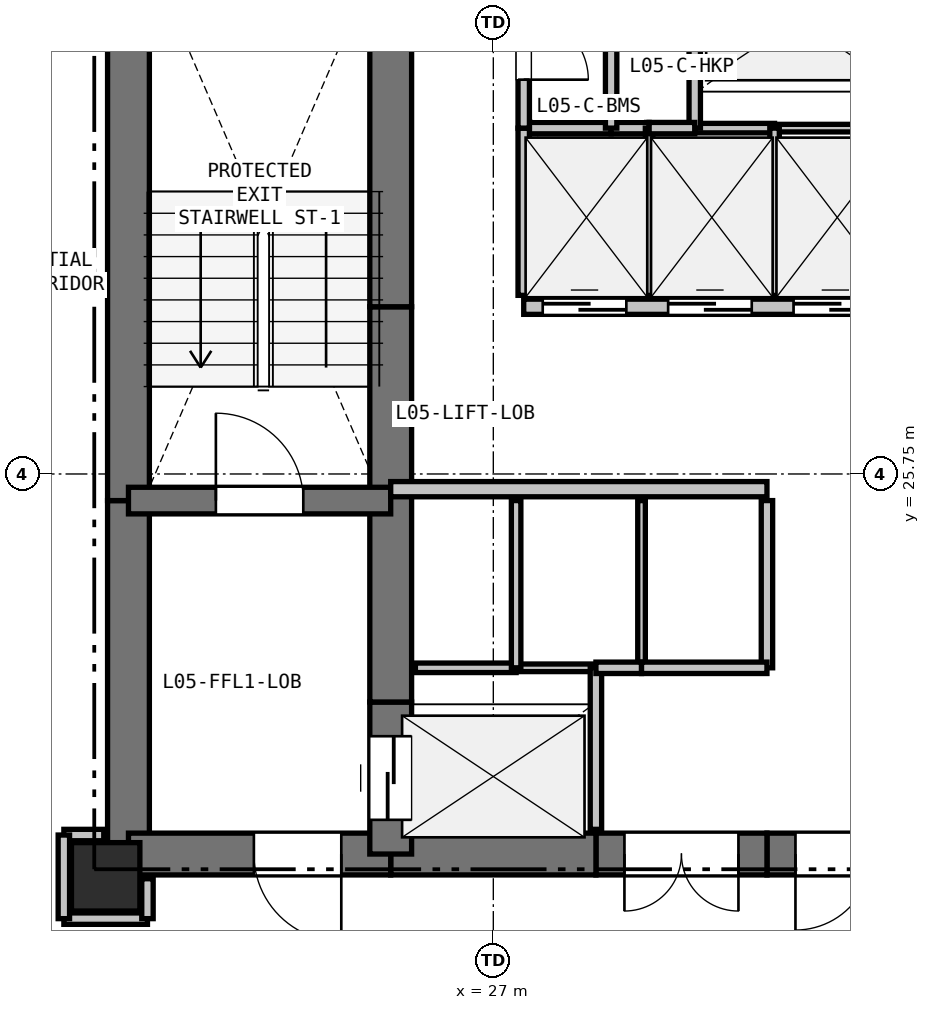
"""IFC4 building model, lengths in metres.
Left out: names, types, materials, properties, quantities, classifications, styles, units other than length and angle.
Written with IfcOpenShell. Run it as: python <this file> out.ifc"""

import sys

from ifc_helpers import new_model, si_unit, direction, frame, frame_2d, origin, origin_2d, place, context, subcontext, project, spatial, rectangle, extrude, element, fill, save


model = new_model("IFC4")
c1 = context("Model", 3, precision=1e-05, world=origin(), true_north=direction((0.0, 1.0)))
c2 = subcontext(c1, "Body", "Model", "MODEL_VIEW")
j1 = project(units=[si_unit("LENGTHUNIT", "METRE"), si_unit("PLANEANGLEUNIT", "RADIAN")], contexts=[c1])
p1 = place(None, origin())
s1 = spatial("IfcSite", under=j1, at=p1, CompositionType="ELEMENT")
p2 = place(p1, origin())
s2 = spatial("IfcBuilding", under=s1, at=p2, CompositionType="ELEMENT")
p3 = place(p2, frame((0.0, 0.0, 22.5)))
s3 = spatial("IfcBuildingStorey", under=s2, at=p3, CompositionType="ELEMENT", Elevation=22.5)
p4 = place(p3, frame((21.9, 20.45, 0.0), z_axis=(0.0, 0.0, 1.0), x_axis=(1.0, 0.0, 0.0)))
e1 = element("IfcColumn", 1, at=p4, inside=s3, PredefinedType="COLUMN", context=c2, shape_type="SweptSolid", body=[
    extrude(rectangle(XDim=0.9, YDim=0.9, at=origin_2d()), origin(), (0.0, 0.0, 1.0), 3.3),
])
p5 = place(p3, frame((22.2, 20.75, 0.0), z_axis=(0.0, 0.0, 1.0), x_axis=(0.0, 1.0, 0.0)))
e2 = element("IfcWall", 2, at=p5, inside=s3, PredefinedType="SHEAR", context=c2, shape_type="SweptSolid", body=[
    extrude(rectangle(XDim=4.65, YDim=0.55, at=frame_2d((2.325, 0.0))), origin(), (0.0, 0.0, 1.0), 3.04),
])
p6 = place(p3, frame((22.2, 25.4, 0.0), z_axis=(0.0, 0.0, 1.0), x_axis=(0.0, 1.0, 0.0)))
e3 = element("IfcWall", 3, at=p6, inside=s3, PredefinedType="SHEAR", context=c2, shape_type="SweptSolid", body=[
    extrude(rectangle(XDim=7.35, YDim=0.55, at=frame_2d((3.675, 0.0))), origin(), (0.0, 0.0, 1.0), 3.04),
])
p7 = place(p3, frame((32.35, 20.75, 0.0), z_axis=(0.0, 0.0, 1.0), x_axis=(-1.0, 0.0, 0.0)))
e4 = element("IfcWall", 4, at=p7, inside=s3, PredefinedType="SHEAR", context=c2, shape_type="SweptSolid", body=[
    extrude(rectangle(XDim=1.75, YDim=0.55, at=frame_2d((0.875, 0.0))), origin(), (0.0, 0.0, 1.0), 3.04),
])
p8 = place(p7, frame((0.375, 0.0, 0.0)))
e5 = element("IfcOpeningElement", 5, at=p8, cuts=e4, PredefinedType="OPENING", context=c2, shape_type="SweptSolid", body=[
    extrude(rectangle(XDim=1.0, YDim=2.15, at=frame_2d((0.5, 1.075))), frame((0.0, 0.285, 0.0), z_axis=(0.0, -1.0, 0.0), x_axis=(1.0, 0.0, 0.0)), (0.0, 0.0, 1.0), 0.57),
])
p9 = place(p3, frame((30.6, 20.75, 0.0), z_axis=(0.0, 0.0, 1.0), x_axis=(-1.0, 0.0, 0.0)))
e6 = element("IfcWall", 6, at=p9, inside=s3, PredefinedType="SHEAR", context=c2, shape_type="SweptSolid", body=[
    extrude(rectangle(XDim=2.25, YDim=0.55, at=frame_2d((1.125, 0.0))), origin(), (0.0, 0.0, 1.0), 3.04),
])
p10 = place(p9, frame((0.375, 0.0, 0.0)))
e7 = element("IfcOpeningElement", 7, at=p10, cuts=e6, PredefinedType="OPENING", context=c2, shape_type="SweptSolid", body=[
    extrude(rectangle(XDim=1.5, YDim=2.2, at=frame_2d((0.75, 1.1))), frame((0.0, 0.285, 0.0), z_axis=(0.0, -1.0, 0.0), x_axis=(1.0, 0.0, 0.0)), (0.0, 0.0, 1.0), 0.57),
])
p11 = place(p3, frame((28.35, 20.75, 0.0), z_axis=(0.0, 0.0, 1.0), x_axis=(-1.0, 0.0, 0.0)))
e8 = element("IfcWall", 8, at=p11, inside=s3, PredefinedType="SHEAR", context=c2, shape_type="SweptSolid", body=[
    extrude(rectangle(XDim=2.7, YDim=0.55, at=frame_2d((1.35, 0.0))), origin(), (0.0, 0.0, 1.0), 3.04),
])
p12 = place(p3, frame((25.65, 20.75, 0.0), z_axis=(0.0, 0.0, 1.0), x_axis=(-1.0, 0.0, 0.0)))
e9 = element("IfcWall", 9, at=p12, inside=s3, PredefinedType="SHEAR", context=c2, shape_type="SweptSolid", body=[
    extrude(rectangle(XDim=3.45, YDim=0.55, at=frame_2d((1.725, 0.0))), origin(), (0.0, 0.0, 1.0), 3.04),
])
p13 = place(p12, frame((0.65, 0.0, 0.0)))
e10 = element("IfcOpeningElement", 10, at=p13, cuts=e9, PredefinedType="OPENING", context=c2, shape_type="SweptSolid", body=[
    extrude(rectangle(XDim=1.15, YDim=2.15, at=frame_2d((0.575, 1.075))), frame((0.0, 0.285, 0.0), z_axis=(0.0, -1.0, 0.0), x_axis=(1.0, 0.0, 0.0)), (0.0, 0.0, 1.0), 0.57),
])
p14 = place(p3, frame((25.65, 20.75, 0.0), z_axis=(0.0, 0.0, 1.0), x_axis=(0.0, 1.0, 0.0)))
e11 = element("IfcWall", 11, at=p14, inside=s3, PredefinedType="SHEAR", context=c2, shape_type="SweptSolid", body=[
    extrude(rectangle(XDim=2.0, YDim=0.55, at=frame_2d((1.0, 0.0))), origin(), (0.0, 0.0, 1.0), 3.04),
])
p15 = place(p14, frame((0.45, 0.0, 0.0)))
e12 = element("IfcOpeningElement", 12, at=p15, cuts=e11, PredefinedType="OPENING", context=c2, shape_type="SweptSolid", body=[
    extrude(rectangle(XDim=1.1, YDim=2.15, at=frame_2d((0.55, 1.075))), frame((0.0, 0.285, 0.0), z_axis=(0.0, -1.0, 0.0), x_axis=(1.0, 0.0, 0.0)), (0.0, 0.0, 1.0), 0.57),
])
p16 = place(p3, frame((25.65, 22.75, 0.0), z_axis=(0.0, 0.0, 1.0), x_axis=(0.0, 1.0, 0.0)))
e13 = element("IfcWall", 13, at=p16, inside=s3, PredefinedType="SHEAR", context=c2, shape_type="SweptSolid", body=[
    extrude(rectangle(XDim=2.8, YDim=0.55, at=frame_2d((1.4, 0.0))), origin(), (0.0, 0.0, 1.0), 3.04),
])
p17 = place(p3, frame((25.65, 25.55, 0.0), z_axis=(0.0, 0.0, 1.0), x_axis=(0.0, 1.0, 0.0)))
e14 = element("IfcWall", 14, at=p17, inside=s3, PredefinedType="SHEAR", context=c2, shape_type="SweptSolid", body=[
    extrude(rectangle(XDim=2.4, YDim=0.55, at=frame_2d((1.2, 0.0))), origin(), (0.0, 0.0, 1.0), 3.04),
])
p18 = place(p3, frame((25.65, 27.95, 0.0), z_axis=(0.0, 0.0, 1.0), x_axis=(0.0, 1.0, 0.0)))
e15 = element("IfcWall", 15, at=p18, inside=s3, PredefinedType="SHEAR", context=c2, shape_type="SweptSolid", body=[
    extrude(rectangle(XDim=4.8, YDim=0.55, at=frame_2d((2.4, 0.0))), origin(), (0.0, 0.0, 1.0), 3.04),
])
p19 = place(p3, frame((22.2, 25.4, 0.0), z_axis=(0.0, 0.0, 1.0), x_axis=(1.0, 0.0, 0.0)))
e16 = element("IfcWall", 16, at=p19, inside=s3, PredefinedType="SHEAR", context=c2, shape_type="SweptSolid", body=[
    extrude(rectangle(XDim=3.45, YDim=0.35, at=frame_2d((1.725, 0.0))), origin(), (0.0, 0.0, 1.0), 3.04),
])
p20 = place(p19, frame((1.15, 0.0, 0.0)))
e17 = element("IfcOpeningElement", 17, at=p20, cuts=e16, PredefinedType="OPENING", context=c2, shape_type="SweptSolid", body=[
    extrude(rectangle(XDim=1.15, YDim=2.15, at=frame_2d((0.575, 1.075))), frame((0.0, 0.185, 0.0), z_axis=(0.0, -1.0, 0.0), x_axis=(1.0, 0.0, 0.0)), (0.0, 0.0, 1.0), 0.37),
])
p21 = place(p3, frame((25.65, 25.55, 0.0), z_axis=(0.0, 0.0, 1.0), x_axis=(1.0, 0.0, 0.0)))
e18 = element("IfcWall", 18, at=p21, inside=s3, PredefinedType="PARTITIONING", context=c2, shape_type="SweptSolid", body=[
    extrude(rectangle(XDim=4.95, YDim=0.2, at=frame_2d((2.475, 0.0))), origin(), (0.0, 0.0, 1.0), 3.04),
])
p22 = place(p3, frame((27.4, 27.95, 0.0), z_axis=(0.0, 0.0, 1.0), x_axis=(1.0, 0.0, 0.0)))
e19 = element("IfcWall", 19, at=p22, inside=s3, PredefinedType="PARTITIONING", context=c2, shape_type="SweptSolid", body=[
    extrude(rectangle(XDim=4.95, YDim=0.2, at=frame_2d((2.475, 0.0))), origin(), (0.0, 0.0, 1.0), 3.04),
])
p23 = place(p22, frame((0.25, 0.0, 0.0)))
e20 = element("IfcOpeningElement", 20, at=p23, cuts=e19, PredefinedType="OPENING", context=c2, shape_type="SweptSolid", body=[
    extrude(rectangle(XDim=1.1, YDim=2.15, at=frame_2d((0.55, 1.075))), frame((0.0, 0.11, 0.0), z_axis=(0.0, -1.0, 0.0), x_axis=(1.0, 0.0, 0.0)), (0.0, 0.0, 1.0), 0.22),
])
p24 = place(p22, frame((1.9, 0.0, 0.0)))
e21 = element("IfcOpeningElement", 21, at=p24, cuts=e19, PredefinedType="OPENING", context=c2, shape_type="SweptSolid", body=[
    extrude(rectangle(XDim=1.1, YDim=2.15, at=frame_2d((0.55, 1.075))), frame((0.0, 0.11, 0.0), z_axis=(0.0, -1.0, 0.0), x_axis=(1.0, 0.0, 0.0)), (0.0, 0.0, 1.0), 0.22),
])
p25 = place(p22, frame((3.55, 0.0, 0.0)))
e22 = element("IfcOpeningElement", 22, at=p25, cuts=e19, PredefinedType="OPENING", context=c2, shape_type="SweptSolid", body=[
    extrude(rectangle(XDim=1.1, YDim=2.15, at=frame_2d((0.55, 1.075))), frame((0.0, 0.11, 0.0), z_axis=(0.0, -1.0, 0.0), x_axis=(1.0, 0.0, 0.0)), (0.0, 0.0, 1.0), 0.22),
])
p26 = place(p3, frame((25.975, 23.2, 0.0), z_axis=(0.0, 0.0, 1.0), x_axis=(1.0, 0.0, 0.0)))
e23 = element("IfcWall", 23, at=p26, inside=s3, PredefinedType="PARTITIONING", context=c2, shape_type="SweptSolid", body=[
    extrude(rectangle(XDim=1.325, YDim=0.125, at=frame_2d((0.663, 0.0))), origin(), (0.0, 0.0, 1.0), 3.04),
])
p27 = place(p3, frame((27.3, 23.2, 0.0), z_axis=(0.0, 0.0, 1.0), x_axis=(1.0, 0.0, 0.0)))
e24 = element("IfcWall", 24, at=p27, inside=s3, PredefinedType="PARTITIONING", context=c2, shape_type="SweptSolid", body=[
    extrude(rectangle(XDim=1.05, YDim=0.1, at=frame_2d((0.525, 0.0))), origin(), (0.0, 0.0, 1.0), 3.04),
])
p28 = place(p3, frame((28.35, 23.2, 0.0), z_axis=(0.0, 0.0, 1.0), x_axis=(0.0, -1.0, 0.0)))
e25 = element("IfcWall", 25, at=p28, inside=s3, PredefinedType="PARTITIONING", context=c2, shape_type="SweptSolid", body=[
    extrude(rectangle(XDim=2.125, YDim=0.15, at=frame_2d((1.062, 0.0))), origin(), (0.0, 0.0, 1.0), 3.04),
])
p29 = place(p3, frame((32.025, 30.3, 0.0), z_axis=(0.0, 0.0, 1.0), x_axis=(-1.0, 0.0, 0.0)))
e26 = element("IfcWall", 26, at=p29, inside=s3, PredefinedType="PARTITIONING", context=c2, shape_type="SweptSolid", body=[
    extrude(rectangle(XDim=1.325, YDim=0.1, at=frame_2d((0.663, 0.0))), origin(), (0.0, 0.0, 1.0), 3.04),
])
p30 = place(p3, frame((30.7, 30.3, 0.0), z_axis=(0.0, 0.0, 1.0), x_axis=(-1.0, 0.0, 0.0)))
e27 = element("IfcWall", 27, at=p30, inside=s3, PredefinedType="PARTITIONING", context=c2, shape_type="SweptSolid", body=[
    extrude(rectangle(XDim=1.05, YDim=0.125, at=frame_2d((0.525, 0.0))), origin(), (0.0, 0.0, 1.0), 3.04),
])
p31 = place(p3, frame((29.65, 30.3, 0.0), z_axis=(0.0, 0.0, 1.0), x_axis=(0.0, 1.0, 0.0)))
e28 = element("IfcWall", 28, at=p31, inside=s3, PredefinedType="PARTITIONING", context=c2, shape_type="SweptSolid", body=[
    extrude(rectangle(XDim=2.125, YDim=0.15, at=frame_2d((1.062, 0.0))), origin(), (0.0, 0.0, 1.0), 3.04),
])
p32 = place(p3, frame((27.3, 25.4, 0.0), z_axis=(0.0, 0.0, 1.0), x_axis=(0.0, -1.0, 0.0)))
e29 = element("IfcWall", 29, at=p32, inside=s3, PredefinedType="PARTITIONING", context=c2, shape_type="SweptSolid", body=[
    extrude(rectangle(XDim=2.2, YDim=0.125, at=frame_2d((1.1, 0.0))), origin(), (0.0, 0.0, 1.0), 3.04),
])
p33 = place(p3, frame((28.95, 25.4, 0.0), z_axis=(0.0, 0.0, 1.0), x_axis=(0.0, -1.0, 0.0)))
e30 = element("IfcWall", 30, at=p33, inside=s3, PredefinedType="PARTITIONING", context=c2, shape_type="SweptSolid", body=[
    extrude(rectangle(XDim=2.2, YDim=0.1, at=frame_2d((1.1, 0.0))), origin(), (0.0, 0.0, 1.0), 3.04),
])
p34 = place(p3, frame((28.95, 23.2, 0.0), z_axis=(0.0, 0.0, 1.0), x_axis=(-1.0, 0.0, 0.0)))
e31 = element("IfcWall", 31, at=p34, inside=s3, PredefinedType="PARTITIONING", context=c2, shape_type="SweptSolid", body=[
    extrude(rectangle(XDim=0.6, YDim=0.15, at=frame_2d((0.3, 0.0))), origin(), (0.0, 0.0, 1.0), 3.04),
])
p35 = place(p3, frame((30.6, 25.4, 0.0), z_axis=(0.0, 0.0, 1.0), x_axis=(0.0, -1.0, 0.0)))
e32 = element("IfcWall", 32, at=p35, inside=s3, PredefinedType="PARTITIONING", context=c2, shape_type="SweptSolid", body=[
    extrude(rectangle(XDim=2.2, YDim=0.15, at=frame_2d((1.1, 0.0))), origin(), (0.0, 0.0, 1.0), 3.04),
])
p36 = place(p3, frame((30.6, 23.2, 0.0), z_axis=(0.0, 0.0, 1.0), x_axis=(-1.0, 0.0, 0.0)))
e33 = element("IfcWall", 33, at=p36, inside=s3, PredefinedType="PARTITIONING", context=c2, shape_type="SweptSolid", body=[
    extrude(rectangle(XDim=1.65, YDim=0.15, at=frame_2d((0.825, 0.0))), origin(), (0.0, 0.0, 1.0), 3.04),
])
p37 = place(p3, frame((27.4, 30.3, 0.0), z_axis=(0.0, 0.0, 1.0), x_axis=(1.0, 0.0, 0.0)))
e34 = element("IfcWall", 34, at=p37, inside=s3, PredefinedType="PARTITIONING", context=c2, shape_type="SweptSolid", body=[
    extrude(rectangle(XDim=1.15, YDim=0.15, at=frame_2d((0.575, 0.0))), origin(), (0.0, 0.0, 1.0), 3.04),
])
p38 = place(p3, frame((28.55, 30.3, 0.0), z_axis=(0.0, 0.0, 1.0), x_axis=(1.0, 0.0, 0.0)))
e35 = element("IfcWall", 35, at=p38, inside=s3, PredefinedType="PARTITIONING", context=c2, shape_type="SweptSolid", body=[
    extrude(rectangle(XDim=0.5, YDim=0.15, at=frame_2d((0.25, 0.0))), origin(), (0.0, 0.0, 1.0), 3.04),
])
p39 = place(p3, frame((29.05, 30.3, 0.0), z_axis=(0.0, 0.0, 1.0), x_axis=(0.0, -1.0, 0.0)))
e36 = element("IfcWall", 36, at=p39, inside=s3, PredefinedType="PARTITIONING", context=c2, shape_type="SweptSolid", body=[
    extrude(rectangle(XDim=2.2, YDim=0.1, at=frame_2d((1.1, 0.0))), origin(), (0.0, 0.0, 1.0), 3.04),
])
p40 = place(p3, frame((27.4, 28.1, 0.0), z_axis=(0.0, 0.0, 1.0), x_axis=(0.0, 1.0, 0.0)))
e37 = element("IfcWall", 37, at=p40, inside=s3, PredefinedType="PARTITIONING", context=c2, shape_type="SweptSolid", body=[
    extrude(rectangle(XDim=2.2, YDim=0.15, at=frame_2d((1.1, 0.0))), origin(), (0.0, 0.0, 1.0), 3.04),
])
p41 = place(p3, frame((29.05, 30.3, 0.0), z_axis=(0.0, 0.0, 1.0), x_axis=(1.0, 0.0, 0.0)))
e38 = element("IfcWall", 38, at=p41, inside=s3, PredefinedType="PARTITIONING", context=c2, shape_type="SweptSolid", body=[
    extrude(rectangle(XDim=0.6, YDim=0.15, at=frame_2d((0.3, 0.0))), origin(), (0.0, 0.0, 1.0), 3.04),
])
p42 = place(p3, frame((30.7, 30.3, 0.0), z_axis=(0.0, 0.0, 1.0), x_axis=(0.0, -1.0, 0.0)))
e39 = element("IfcWall", 39, at=p42, inside=s3, PredefinedType="PARTITIONING", context=c2, shape_type="SweptSolid", body=[
    extrude(rectangle(XDim=2.2, YDim=0.125, at=frame_2d((1.1, 0.0))), origin(), (0.0, 0.0, 1.0), 3.04),
])
p43 = place(p3, frame((27.4, 32.425, 0.0), z_axis=(0.0, 0.0, 1.0), x_axis=(0.0, -1.0, 0.0)))
e40 = element("IfcWall", 40, at=p43, inside=s3, PredefinedType="PARTITIONING", context=c2, shape_type="SweptSolid", body=[
    extrude(rectangle(XDim=2.125, YDim=0.15, at=frame_2d((1.062, 0.0))), origin(), (0.0, 0.0, 1.0), 3.04),
])
p44 = place(p43, frame((0.637, 0.0, 0.0)))
e41 = element("IfcOpeningElement", 41, at=p44, cuts=e40, PredefinedType="OPENING", context=c2, shape_type="SweptSolid", body=[
    extrude(rectangle(XDim=0.85, YDim=2.1, at=frame_2d((0.425, 1.05))), frame((0.0, 0.085, 0.0), z_axis=(0.0, -1.0, 0.0), x_axis=(1.0, 0.0, 0.0)), (0.0, 0.0, 1.0), 0.17),
])
p45 = place(p3, frame((21.35, 19.9, 0.0), z_axis=(0.0, 0.0, 1.0), x_axis=(1.0, 0.0, 0.0)))
e42 = element("IfcWall", 42, at=p45, inside=s3, PredefinedType="PARTITIONING", context=c2, shape_type="SweptSolid", body=[
    extrude(rectangle(XDim=1.1, YDim=0.15, at=frame_2d((0.55, 0.0))), origin(), (0.0, 0.0, 1.0), 2.337),
])
p46 = place(p3, frame((22.45, 19.9, 0.0), z_axis=(0.0, 0.0, 1.0), x_axis=(0.0, 1.0, 0.0)))
e43 = element("IfcWall", 43, at=p46, inside=s3, PredefinedType="PARTITIONING", context=c2, shape_type="SweptSolid", body=[
    extrude(rectangle(XDim=0.525, YDim=0.15, at=frame_2d((0.263, 0.0))), origin(), (0.0, 0.0, 1.0), 2.337),
])
p47 = place(p3, frame((21.875, 21.0, 0.0), z_axis=(0.0, 0.0, 1.0), x_axis=(-1.0, 0.0, 0.0)))
e44 = element("IfcWall", 44, at=p47, inside=s3, PredefinedType="PARTITIONING", context=c2, shape_type="SweptSolid", body=[
    extrude(rectangle(XDim=0.525, YDim=0.15, at=frame_2d((0.262, 0.0))), origin(), (0.0, 0.0, 1.0), 2.488),
])
p48 = place(p3, frame((21.35, 21.0, 0.0), z_axis=(0.0, 0.0, 1.0), x_axis=(0.0, -1.0, 0.0)))
e45 = element("IfcWall", 45, at=p48, inside=s3, PredefinedType="PARTITIONING", context=c2, shape_type="SweptSolid", body=[
    extrude(rectangle(XDim=1.1, YDim=0.15, at=frame_2d((0.55, 0.0))), origin(), (0.0, 0.0, 1.0), 2.337),
])
p49 = place(p3, frame((28.55, 32.425, 0.0), z_axis=(0.0, 0.0, 1.0), x_axis=(0.0, -1.0, 0.0)))
e46 = element("IfcWall", 46, at=p49, inside=s3, PredefinedType="PARTITIONING", context=c2, shape_type="SweptSolid", body=[
    extrude(rectangle(XDim=2.125, YDim=0.15, at=frame_2d((1.062, 0.0))), origin(), (0.0, 0.0, 1.0), 3.04),
])
p50 = place(p23, origin())
e47 = element("IfcDoor", 47, at=p50, inside=s3, OperationType="SLIDING_TO_LEFT", PredefinedType="DOOR", context=c2, shape_type="SweptSolid", body=[
    extrude(rectangle(XDim=1.1, YDim=2.15, at=frame_2d((0.55, 1.075))), frame((0.0, 0.025, 0.0), z_axis=(0.0, -1.0, 0.0), x_axis=(1.0, 0.0, 0.0)), (0.0, 0.0, 1.0), 0.05),
])
fill(e20, e47)
p51 = place(p24, origin())
e48 = element("IfcDoor", 48, at=p51, inside=s3, OperationType="SLIDING_TO_LEFT", PredefinedType="DOOR", context=c2, shape_type="SweptSolid", body=[
    extrude(rectangle(XDim=1.1, YDim=2.15, at=frame_2d((0.55, 1.075))), frame((0.0, 0.025, 0.0), z_axis=(0.0, -1.0, 0.0), x_axis=(1.0, 0.0, 0.0)), (0.0, 0.0, 1.0), 0.05),
])
fill(e21, e48)
p52 = place(p25, origin())
e49 = element("IfcDoor", 49, at=p52, inside=s3, OperationType="SLIDING_TO_LEFT", PredefinedType="DOOR", context=c2, shape_type="SweptSolid", body=[
    extrude(rectangle(XDim=1.1, YDim=2.15, at=frame_2d((0.55, 1.075))), frame((0.0, 0.025, 0.0), z_axis=(0.0, -1.0, 0.0), x_axis=(1.0, 0.0, 0.0)), (0.0, 0.0, 1.0), 0.05),
])
fill(e22, e49)
p53 = place(p8, origin())
e50 = element("IfcDoor", 50, at=p53, inside=s3, OperationType="SINGLE_SWING_RIGHT", PredefinedType="DOOR", context=c2, shape_type="SweptSolid", body=[
    extrude(rectangle(XDim=1.0, YDim=2.15, at=frame_2d((0.5, 1.075))), frame((0.0, 0.025, 0.0), z_axis=(0.0, -1.0, 0.0), x_axis=(1.0, 0.0, 0.0)), (0.0, 0.0, 1.0), 0.05),
])
fill(e5, e50)
p54 = place(p15, origin())
e51 = element("IfcDoor", 51, at=p54, inside=s3, OperationType="SLIDING_TO_LEFT", PredefinedType="DOOR", context=c2, shape_type="SweptSolid", body=[
    extrude(rectangle(XDim=1.1, YDim=2.15, at=frame_2d((0.55, 1.075))), frame((0.0, 0.025, 0.0), z_axis=(0.0, -1.0, 0.0), x_axis=(1.0, 0.0, 0.0)), (0.0, 0.0, 1.0), 0.05),
])
fill(e12, e51)
p55 = place(p20, origin())
e52 = element("IfcDoor", 52, at=p55, inside=s3, OperationType="SINGLE_SWING_LEFT", PredefinedType="DOOR", context=c2, shape_type="SweptSolid", body=[
    extrude(rectangle(XDim=1.15, YDim=2.15, at=frame_2d((0.575, 1.075))), frame((0.0, 0.025, 0.0), z_axis=(0.0, -1.0, 0.0), x_axis=(1.0, 0.0, 0.0)), (0.0, 0.0, 1.0), 0.05),
])
fill(e17, e52)
p56 = place(p13, origin())
e53 = element("IfcDoor", 53, at=p56, inside=s3, OperationType="SINGLE_SWING_LEFT", PredefinedType="DOOR", context=c2, shape_type="SweptSolid", body=[
    extrude(rectangle(XDim=1.15, YDim=2.15, at=frame_2d((0.575, 1.075))), frame((0.0, 0.025, 0.0), z_axis=(0.0, -1.0, 0.0), x_axis=(1.0, 0.0, 0.0)), (0.0, 0.0, 1.0), 0.05),
])
fill(e10, e53)
p57 = place(p10, origin())
e54 = element("IfcDoor", 54, at=p57, inside=s3, OperationType="DOUBLE_DOOR_SINGLE_SWING", PredefinedType="DOOR", context=c2, shape_type="SweptSolid", body=[
    extrude(rectangle(XDim=1.5, YDim=2.2, at=frame_2d((0.75, 1.1))), frame((0.0, 0.025, 0.0), z_axis=(0.0, -1.0, 0.0), x_axis=(1.0, 0.0, 0.0)), (0.0, 0.0, 1.0), 0.05),
])
fill(e7, e54)
p58 = place(p44, origin())
e55 = element("IfcDoor", 55, at=p58, inside=s3, OperationType="SINGLE_SWING_RIGHT", PredefinedType="DOOR", context=c2, shape_type="SweptSolid", body=[
    extrude(rectangle(XDim=0.85, YDim=2.1, at=frame_2d((0.425, 1.05))), frame((0.0, 0.025, 0.0), z_axis=(0.0, -1.0, 0.0), x_axis=(1.0, 0.0, 0.0)), (0.0, 0.0, 1.0), 0.05),
])
fill(e41, e55)
save(model, sys.argv[1])
